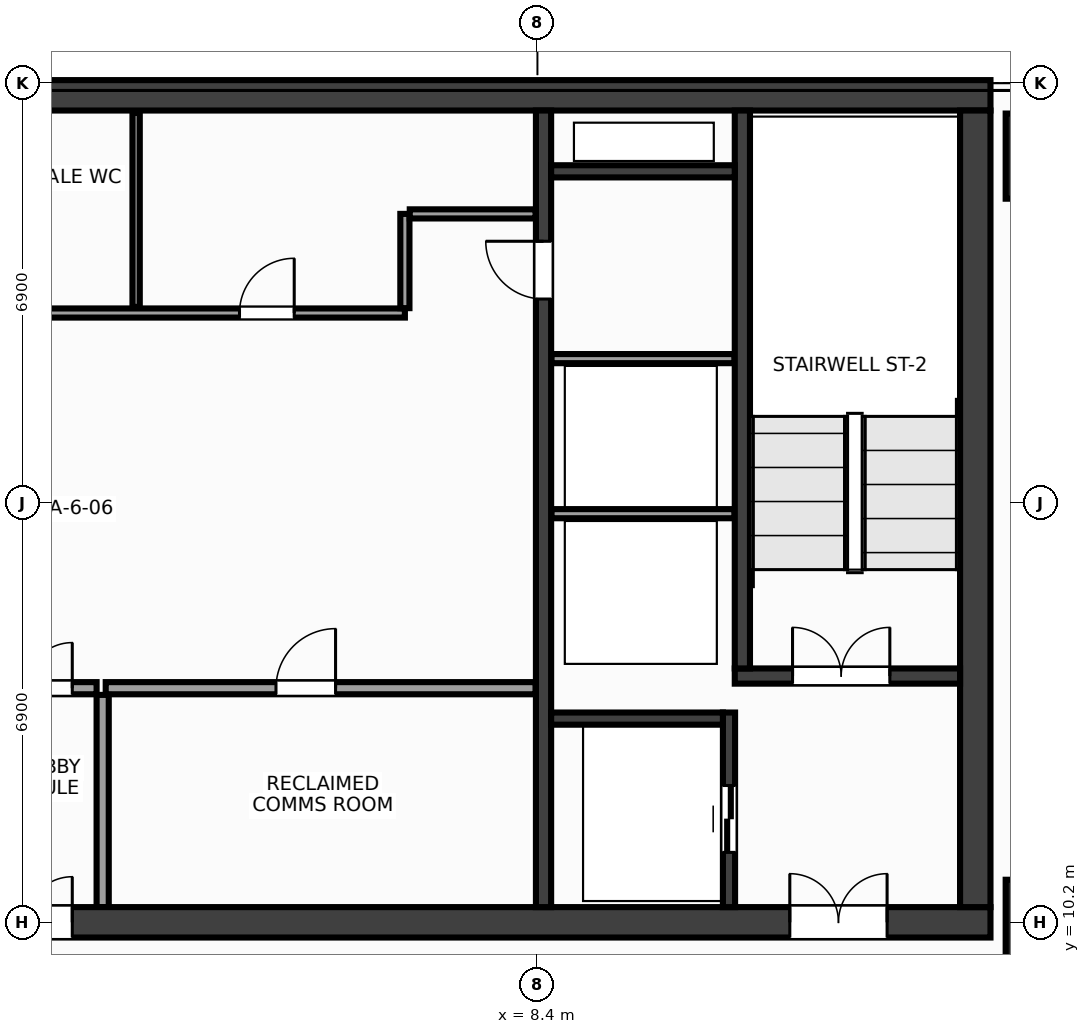
"""IFC4 building model, lengths in metres.
Left out: names, types, materials, properties, quantities, classifications, styles, units other than length and angle.
Written with IfcOpenShell. Run it as: python <this file> out.ifc"""

import sys

from ifc_helpers import new_model, si_unit, direction, frame, frame_2d, origin, origin_2d, place, context, subcontext, project, spatial, rectangle, extrude, source, transform, mapped, element, fill, save


model = new_model("IFC4")
c1 = context("Model", 3, precision=1e-05, world=origin(), true_north=direction((0.0, 1.0)))
c2 = subcontext(c1, "Body", "Model", "MODEL_VIEW")
j1 = project(units=[si_unit("LENGTHUNIT", "METRE"), si_unit("PLANEANGLEUNIT", "RADIAN")], contexts=[c1])
p1 = place(None, origin())
s1 = spatial("IfcSite", under=j1, at=p1, CompositionType="ELEMENT")
p2 = place(p1, origin())
s2 = spatial("IfcBuilding", under=s1, at=p2, CompositionType="ELEMENT")
p3 = place(p2, frame((0.0, 0.0, 210.8)))
s3 = spatial("IfcBuildingStorey", under=s2, at=p3, CompositionType="ELEMENT", Elevation=210.8)
m1 = source(origin(), c2, "Body", "SweptSolid", [
    extrude(rectangle(XDim=31.7, YDim=0.5, at=frame_2d((15.85, 0.0))), origin(), (0.0, 0.0, 1.0), 3.6),
])
p4 = place(p3, frame((-15.85, 23.8, 0.0), z_axis=(0.0, 0.0, 1.0), x_axis=(1.0, 0.0, 0.0)))
e1 = element("IfcWall", 1, at=p4, inside=s3, PredefinedType="SHEAR", context=c2, shape_type="MappedRepresentation", body=[
    mapped(m1, transform((0.0, 0.0, 0.0), x_axis=(1.0, 0.0, 0.0), y_axis=(0.0, 1.0, 0.0), z_axis=(0.0, 0.0, 1.0), scale=1.0)),
])
p5 = place(p3, frame((-15.85, 10.2, 0.0), z_axis=(0.0, 0.0, 1.0), x_axis=(1.0, 0.0, 0.0)))
e2 = element("IfcWall", 2, at=p5, inside=s3, PredefinedType="SHEAR", context=c2, shape_type="MappedRepresentation", body=[
    mapped(m1, transform((0.0, 0.0, 0.0), x_axis=(1.0, 0.0, 0.0), y_axis=(0.0, 1.0, 0.0), z_axis=(0.0, 0.0, 1.0), scale=1.0)),
])
p6 = place(p5, frame((1.7, 0.0, 0.0)))
e3 = element("IfcOpeningElement", 3, at=p6, cuts=e2, PredefinedType="OPENING", context=c2, shape_type="SweptSolid", body=[
    extrude(rectangle(XDim=1.6, YDim=2.15, at=frame_2d((0.8, 1.075))), frame((0.0, 0.262, 0.0), z_axis=(0.0, -1.0, 0.0), x_axis=(1.0, 0.0, 0.0)), (0.0, 0.0, 1.0), 0.524),
])
p7 = place(p5, frame((28.4, 0.0, 0.0)))
e4 = element("IfcOpeningElement", 4, at=p7, cuts=e2, PredefinedType="OPENING", context=c2, shape_type="SweptSolid", body=[
    extrude(rectangle(XDim=1.6, YDim=2.15, at=frame_2d((0.8, 1.075))), frame((0.0, 0.262, 0.0), z_axis=(0.0, -1.0, 0.0), x_axis=(1.0, 0.0, 0.0)), (0.0, 0.0, 1.0), 0.524),
])
p8 = place(p5, frame((15.1, 0.0, 0.0)))
e5 = element("IfcOpeningElement", 5, at=p8, cuts=e2, PredefinedType="OPENING", context=c2, shape_type="SweptSolid", body=[
    extrude(rectangle(XDim=1.5, YDim=2.2, at=frame_2d((0.75, 1.1))), frame((0.0, 0.262, 0.0), z_axis=(0.0, -1.0, 0.0), x_axis=(1.0, 0.0, 0.0)), (0.0, 0.0, 1.0), 0.524),
])
m2 = source(origin(), c2, "Body", "SweptSolid", [
    extrude(rectangle(XDim=13.1, YDim=0.5, at=frame_2d((6.55, 0.0))), origin(), (0.0, 0.0, 1.0), 3.6),
])
p9 = place(p3, frame((15.6, 10.45, 0.0), z_axis=(0.0, 0.0, 1.0), x_axis=(0.0, 1.0, 0.0)))
e6 = element("IfcWall", 6, at=p9, inside=s3, PredefinedType="SHEAR", context=c2, shape_type="MappedRepresentation", body=[
    mapped(m2, transform((0.0, 0.0, 0.0), x_axis=(1.0, 0.0, 0.0), y_axis=(0.0, 1.0, 0.0), z_axis=(0.0, 0.0, 1.0), scale=1.0)),
])
m3 = source(origin(), c2, "Body", "SweptSolid", [
    extrude(rectangle(XDim=13.1, YDim=0.25, at=frame_2d((6.55, 0.0))), origin(), (0.0, 0.0, 1.0), 3.6),
])
p10 = place(p3, frame((8.5, 10.45, 0.0), z_axis=(0.0, 0.0, 1.0), x_axis=(0.0, 1.0, 0.0)))
e7 = element("IfcWall", 7, at=p10, inside=s3, PredefinedType="SHEAR", context=c2, shape_type="MappedRepresentation", body=[
    mapped(m3, transform((0.0, 0.0, 0.0), x_axis=(1.0, 0.0, 0.0), y_axis=(0.0, 1.0, 0.0), z_axis=(0.0, 0.0, 1.0), scale=1.0)),
])
p11 = place(p10, frame((10.0, 0.0, 0.0)))
e8 = element("IfcOpeningElement", 8, at=p11, cuts=e7, PredefinedType="OPENING", context=c2, shape_type="SweptSolid", body=[
    extrude(rectangle(XDim=0.95, YDim=2.15, at=frame_2d((0.475, 1.075))), frame((0.0, 0.137, 0.0), z_axis=(0.0, -1.0, 0.0), x_axis=(1.0, 0.0, 0.0)), (0.0, 0.0, 1.0), 0.274),
])
m4 = source(origin(), c2, "Body", "SweptSolid", [
    extrude(rectangle(XDim=3.705, YDim=0.25, at=frame_2d((1.853, 0.0))), origin(), (0.0, 0.0, 1.0), 3.6),
])
p12 = place(p3, frame((11.645, 14.25, 0.0), z_axis=(0.0, 0.0, 1.0), x_axis=(1.0, 0.0, 0.0)))
e9 = element("IfcWall", 9, at=p12, inside=s3, PredefinedType="SHEAR", context=c2, shape_type="MappedRepresentation", body=[
    mapped(m4, transform((0.0, 0.0, 0.0), x_axis=(1.0, 0.0, 0.0), y_axis=(0.0, 1.0, 0.0), z_axis=(0.0, 0.0, 1.0), scale=1.0)),
])
p13 = place(p12, frame((0.95, 0.0, 0.0)))
e10 = element("IfcOpeningElement", 10, at=p13, cuts=e9, PredefinedType="OPENING", context=c2, shape_type="SweptSolid", body=[
    extrude(rectangle(XDim=1.6, YDim=2.15, at=frame_2d((0.8, 1.075))), frame((0.0, 0.137, 0.0), z_axis=(0.0, -1.0, 0.0), x_axis=(1.0, 0.0, 0.0)), (0.0, 0.0, 1.0), 0.274),
])
m5 = source(origin(), c2, "Body", "SweptSolid", [
    extrude(rectangle(XDim=9.175, YDim=0.25, at=frame_2d((4.587, 0.0))), origin(), (0.0, 0.0, 1.0), 3.6),
])
p14 = place(p3, frame((11.77, 14.375, 0.0), z_axis=(0.0, 0.0, 1.0), x_axis=(0.0, 1.0, 0.0)))
e11 = element("IfcWall", 11, at=p14, inside=s3, PredefinedType="SHEAR", context=c2, shape_type="MappedRepresentation", body=[
    mapped(m5, transform((0.0, 0.0, 0.0), x_axis=(1.0, 0.0, 0.0), y_axis=(0.0, 1.0, 0.0), z_axis=(0.0, 0.0, 1.0), scale=1.0)),
])
m6 = source(origin(), c2, "Body", "SweptSolid", [
    extrude(rectangle(XDim=3.2, YDim=0.2, at=frame_2d((1.6, 0.0))), origin(), (0.0, 0.0, 1.0), 3.6),
])
p15 = place(p3, frame((11.55, 10.45, 0.0), z_axis=(0.0, 0.0, 1.0), x_axis=(0.0, 1.0, 0.0)))
e12 = element("IfcWall", 12, at=p15, inside=s3, PredefinedType="SHEAR", context=c2, shape_type="MappedRepresentation", body=[
    mapped(m6, transform((0.0, 0.0, 0.0), x_axis=(1.0, 0.0, 0.0), y_axis=(0.0, 1.0, 0.0), z_axis=(0.0, 0.0, 1.0), scale=1.0)),
])
p16 = place(p15, frame((0.9, 0.0, 0.0)))
e13 = element("IfcOpeningElement", 13, at=p16, cuts=e12, PredefinedType="OPENING", context=c2, shape_type="SweptSolid", body=[
    extrude(rectangle(XDim=1.1, YDim=2.15, at=frame_2d((0.55, 1.075))), frame((0.0, 0.112, 0.0), z_axis=(0.0, -1.0, 0.0), x_axis=(1.0, 0.0, 0.0)), (0.0, 0.0, 1.0), 0.224),
])
m7 = source(origin(), c2, "Body", "SweptSolid", [
    extrude(rectangle(XDim=2.825, YDim=0.2, at=frame_2d((1.413, 0.0))), origin(), (0.0, 0.0, 1.0), 3.6),
])
p17 = place(p3, frame((8.625, 13.55, 0.0), z_axis=(0.0, 0.0, 1.0), x_axis=(1.0, 0.0, 0.0)))
e14 = element("IfcWall", 14, at=p17, inside=s3, PredefinedType="SHEAR", context=c2, shape_type="MappedRepresentation", body=[
    mapped(m7, transform((0.0, 0.0, 0.0), x_axis=(1.0, 0.0, 0.0), y_axis=(0.0, 1.0, 0.0), z_axis=(0.0, 0.0, 1.0), scale=1.0)),
])
m8 = source(origin(), c2, "Body", "SweptSolid", [
    extrude(rectangle(XDim=3.02, YDim=0.2, at=frame_2d((1.51, 0.0))), origin(), (0.0, 0.0, 1.0), 3.6),
])
p18 = place(p3, frame((8.625, 22.55, 0.0), z_axis=(0.0, 0.0, 1.0), x_axis=(1.0, 0.0, 0.0)))
e15 = element("IfcWall", 15, at=p18, inside=s3, PredefinedType="SHEAR", context=c2, shape_type="MappedRepresentation", body=[
    mapped(m8, transform((0.0, 0.0, 0.0), x_axis=(1.0, 0.0, 0.0), y_axis=(0.0, 1.0, 0.0), z_axis=(0.0, 0.0, 1.0), scale=1.0)),
])
m9 = source(origin(), c2, "Body", "SweptSolid", [
    extrude(rectangle(XDim=1.4, YDim=1.4, at=origin_2d()), origin(), (0.0, 0.0, 1.0), 3.6),
])
for number, where, z_axis, x_axis in (
    (16, (16.8, 10.2, 0.0), (0.0, 0.0, 1.0), (1.0, 0.0, 0.0)),
    (17, (16.8, 22.8, 0.0), (0.0, 0.0, 1.0), (1.0, 0.0, 0.0)),
):
    element("IfcColumn", number, at=place(p3, frame(where, z_axis=z_axis, x_axis=x_axis)), inside=s3, PredefinedType="COLUMN", context=c2, shape_type="MappedRepresentation", body=[
        mapped(m9, transform((0.0, 0.0, 0.0), x_axis=(1.0, 0.0, 0.0), y_axis=(0.0, 1.0, 0.0), z_axis=(0.0, 0.0, 1.0), scale=1.0)),
    ])
m10 = source(origin(), c2, "Body", "SweptSolid", [
    extrude(rectangle(XDim=3.01, YDim=0.15, at=frame_2d((1.505, 0.0))), origin(), (0.0, 0.0, 1.0), 3.38),
])
for number, where, z_axis, x_axis in (
    (18, (8.63, 16.92, 0.0), (0.0, 0.0, 1.0), (1.0, 0.0, 0.0)),
    (19, (8.63, 19.47, 0.0), (0.0, 0.0, 1.0), (1.0, 0.0, 0.0)),
):
    element("IfcWall", number, at=place(p3, frame(where, z_axis=z_axis, x_axis=x_axis)), inside=s3, PredefinedType="PARTITIONING", context=c2, shape_type="MappedRepresentation", body=[
        mapped(m10, transform((0.0, 0.0, 0.0), x_axis=(1.0, 0.0, 0.0), y_axis=(0.0, 1.0, 0.0), z_axis=(0.0, 0.0, 1.0), scale=1.0)),
    ])
m11 = source(origin(), c2, "Body", "SweptSolid", [
    extrude(rectangle(XDim=7.07, YDim=0.2, at=frame_2d((3.535, 0.0))), origin(), (0.0, 0.0, 1.0), 3.38),
])
p19 = place(p3, frame((1.3, 14.05, 0.0), z_axis=(0.0, 0.0, 1.0), x_axis=(1.0, 0.0, 0.0)))
e20 = element("IfcWall", 20, at=p19, inside=s3, PredefinedType="PARTITIONING", context=c2, shape_type="MappedRepresentation", body=[
    mapped(m11, transform((0.0, 0.0, 0.0), x_axis=(1.0, 0.0, 0.0), y_axis=(0.0, 1.0, 0.0), z_axis=(0.0, 0.0, 1.0), scale=1.0)),
])
p20 = place(p19, frame((2.8, 0.0, 0.0)))
e21 = element("IfcOpeningElement", 21, at=p20, cuts=e20, PredefinedType="OPENING", context=c2, shape_type="SweptSolid", body=[
    extrude(rectangle(XDim=0.98, YDim=2.15, at=frame_2d((0.49, 1.075))), frame((0.0, 0.112, 0.0), z_axis=(0.0, -1.0, 0.0), x_axis=(1.0, 0.0, 0.0)), (0.0, 0.0, 1.0), 0.224),
])
m12 = source(origin(), c2, "Body", "SweptSolid", [
    extrude(rectangle(XDim=3.49, YDim=0.2, at=frame_2d((1.745, 0.0))), origin(), (0.0, 0.0, 1.0), 3.38),
])
p21 = place(p3, frame((1.25, 10.45, 0.0), z_axis=(0.0, 0.0, 1.0), x_axis=(0.0, 1.0, 0.0)))
e22 = element("IfcWall", 22, at=p21, inside=s3, PredefinedType="PARTITIONING", context=c2, shape_type="MappedRepresentation", body=[
    mapped(m12, transform((0.0, 0.0, 0.0), x_axis=(1.0, 0.0, 0.0), y_axis=(0.0, 1.0, 0.0), z_axis=(0.0, 0.0, 1.0), scale=1.0)),
])
m13 = source(origin(), c2, "Body", "SweptSolid", [
    extrude(rectangle(XDim=2.3, YDim=0.2, at=frame_2d((1.15, 0.0))), origin(), (0.0, 0.0, 1.0), 3.38),
])
p22 = place(p3, frame((-1.15, 14.05, 0.0), z_axis=(0.0, 0.0, 1.0), x_axis=(1.0, 0.0, 0.0)))
e23 = element("IfcWall", 23, at=p22, inside=s3, PredefinedType="PARTITIONING", context=c2, shape_type="MappedRepresentation", body=[
    mapped(m13, transform((0.0, 0.0, 0.0), x_axis=(1.0, 0.0, 0.0), y_axis=(0.0, 1.0, 0.0), z_axis=(0.0, 0.0, 1.0), scale=1.0)),
])
p23 = place(p22, frame((0.4, 0.0, 0.0)))
e24 = element("IfcOpeningElement", 24, at=p23, cuts=e23, PredefinedType="OPENING", context=c2, shape_type="SweptSolid", body=[
    extrude(rectangle(XDim=1.5, YDim=2.2, at=frame_2d((0.75, 1.1))), frame((0.0, 0.112, 0.0), z_axis=(0.0, -1.0, 0.0), x_axis=(1.0, 0.0, 0.0)), (0.0, 0.0, 1.0), 0.224),
])
m14 = source(origin(), c2, "Body", "SweptSolid", [
    extrude(rectangle(XDim=14.59, YDim=0.15, at=frame_2d((7.295, 0.0))), origin(), (0.0, 0.0, 1.0), 3.38),
])
p24 = place(p3, frame((-8.37, 20.22, 0.0), z_axis=(0.0, 0.0, 1.0), x_axis=(1.0, 0.0, 0.0)))
e25 = element("IfcWall", 25, at=p24, inside=s3, PredefinedType="PARTITIONING", context=c2, shape_type="MappedRepresentation", body=[
    mapped(m14, transform((0.0, 0.0, 0.0), x_axis=(1.0, 0.0, 0.0), y_axis=(0.0, 1.0, 0.0), z_axis=(0.0, 0.0, 1.0), scale=1.0)),
])
p25 = place(p24, frame((1.06, 0.0, 0.0)))
e26 = element("IfcOpeningElement", 26, at=p25, cuts=e25, PredefinedType="OPENING", context=c2, shape_type="SweptSolid", body=[
    extrude(rectangle(XDim=0.9, YDim=2.15, at=frame_2d((0.45, 1.075))), frame((0.0, 0.087, 0.0), z_axis=(0.0, -1.0, 0.0), x_axis=(1.0, 0.0, 0.0)), (0.0, 0.0, 1.0), 0.174),
])
p26 = place(p24, frame((4.22, 0.0, 0.0)))
e27 = element("IfcOpeningElement", 27, at=p26, cuts=e25, PredefinedType="OPENING", context=c2, shape_type="SweptSolid", body=[
    extrude(rectangle(XDim=0.9, YDim=2.15, at=frame_2d((0.45, 1.075))), frame((0.0, 0.087, 0.0), z_axis=(0.0, -1.0, 0.0), x_axis=(1.0, 0.0, 0.0)), (0.0, 0.0, 1.0), 0.174),
])
p27 = place(p24, frame((7.82, 0.0, 0.0)))
e28 = element("IfcOpeningElement", 28, at=p27, cuts=e25, PredefinedType="OPENING", context=c2, shape_type="SweptSolid", body=[
    extrude(rectangle(XDim=0.9, YDim=2.15, at=frame_2d((0.45, 1.075))), frame((0.0, 0.087, 0.0), z_axis=(0.0, -1.0, 0.0), x_axis=(1.0, 0.0, 0.0)), (0.0, 0.0, 1.0), 0.174),
])
p28 = place(p24, frame((11.87, 0.0, 0.0)))
e29 = element("IfcOpeningElement", 29, at=p28, cuts=e25, PredefinedType="OPENING", context=c2, shape_type="SweptSolid", body=[
    extrude(rectangle(XDim=0.9, YDim=2.15, at=frame_2d((0.45, 1.075))), frame((0.0, 0.087, 0.0), z_axis=(0.0, -1.0, 0.0), x_axis=(1.0, 0.0, 0.0)), (0.0, 0.0, 1.0), 0.174),
])
m15 = source(origin(), c2, "Body", "SweptSolid", [
    extrude(rectangle(XDim=1.55, YDim=0.15, at=frame_2d((0.775, 0.0))), origin(), (0.0, 0.0, 1.0), 3.38),
])
p29 = place(p3, frame((6.22, 20.3, 0.0), z_axis=(0.0, 0.0, 1.0), x_axis=(0.0, 1.0, 0.0)))
e30 = element("IfcWall", 30, at=p29, inside=s3, PredefinedType="PARTITIONING", context=c2, shape_type="MappedRepresentation", body=[
    mapped(m15, transform((0.0, 0.0, 0.0), x_axis=(1.0, 0.0, 0.0), y_axis=(0.0, 1.0, 0.0), z_axis=(0.0, 0.0, 1.0), scale=1.0)),
])
m16 = source(origin(), c2, "Body", "SweptSolid", [
    extrude(rectangle(XDim=2.07, YDim=0.15, at=frame_2d((1.035, 0.0))), origin(), (0.0, 0.0, 1.0), 3.38),
])
p30 = place(p3, frame((6.3, 21.85, 0.0), z_axis=(0.0, 0.0, 1.0), x_axis=(1.0, 0.0, 0.0)))
e31 = element("IfcWall", 31, at=p30, inside=s3, PredefinedType="PARTITIONING", context=c2, shape_type="MappedRepresentation", body=[
    mapped(m16, transform((0.0, 0.0, 0.0), x_axis=(1.0, 0.0, 0.0), y_axis=(0.0, 1.0, 0.0), z_axis=(0.0, 0.0, 1.0), scale=1.0)),
])
m17 = source(origin(), c2, "Body", "SweptSolid", [
    extrude(rectangle(XDim=3.19, YDim=0.12, at=frame_2d((1.595, 0.0))), origin(), (0.0, 0.0, 1.0), 3.38),
])
p31 = place(p3, frame((1.8, 20.32, 0.0), z_axis=(0.0, 0.0, 1.0), x_axis=(0.0, 1.0, 0.0)))
e32 = element("IfcWall", 32, at=p31, inside=s3, PredefinedType="PARTITIONING", context=c2, shape_type="MappedRepresentation", body=[
    mapped(m17, transform((0.0, 0.0, 0.0), x_axis=(1.0, 0.0, 0.0), y_axis=(0.0, 1.0, 0.0), z_axis=(0.0, 0.0, 1.0), scale=1.0)),
])
m18 = source(origin(), c2, "Body", "SweptSolid", [
    extrude(rectangle(XDim=1.6, YDim=2.15, at=frame_2d((0.8, 1.075))), frame((0.0, 0.025, 0.0), z_axis=(0.0, -1.0, 0.0), x_axis=(1.0, 0.0, 0.0)), (0.0, 0.0, 1.0), 0.05),
])
p32 = place(p13, origin())
e33 = element("IfcDoor", 33, at=p32, inside=s3, OperationType="DOUBLE_DOOR_SINGLE_SWING", PredefinedType="DOOR", context=c2, shape_type="MappedRepresentation", body=[
    mapped(m18, transform((0.0, 0.0, 0.0), x_axis=(1.0, 0.0, 0.0), y_axis=(0.0, 1.0, 0.0), z_axis=(0.0, 0.0, 1.0), scale=1.0)),
])
fill(e10, e33)
p33 = place(p7, origin())
e34 = element("IfcDoor", 34, at=p33, inside=s3, OperationType="DOUBLE_DOOR_SINGLE_SWING", PredefinedType="DOOR", context=c2, shape_type="MappedRepresentation", body=[
    mapped(m18, transform((0.0, 0.0, 0.0), x_axis=(1.0, 0.0, 0.0), y_axis=(0.0, 1.0, 0.0), z_axis=(0.0, 0.0, 1.0), scale=1.0)),
])
fill(e4, e34)
m19 = source(origin(), c2, "Body", "SweptSolid", [
    extrude(rectangle(XDim=1.1, YDim=2.15, at=frame_2d((0.55, 1.075))), frame((0.0, 0.025, 0.0), z_axis=(0.0, -1.0, 0.0), x_axis=(1.0, 0.0, 0.0)), (0.0, 0.0, 1.0), 0.05),
])
p34 = place(p16, origin())
e35 = element("IfcDoor", 35, at=p34, inside=s3, OperationType="DOUBLE_DOOR_SLIDING", PredefinedType="DOOR", context=c2, shape_type="MappedRepresentation", body=[
    mapped(m19, transform((0.0, 0.0, 0.0), x_axis=(1.0, 0.0, 0.0), y_axis=(0.0, 1.0, 0.0), z_axis=(0.0, 0.0, 1.0), scale=1.0)),
])
fill(e13, e35)
m20 = source(origin(), c2, "Body", "SweptSolid", [
    extrude(rectangle(XDim=0.95, YDim=2.15, at=frame_2d((0.475, 1.075))), frame((0.0, 0.025, 0.0), z_axis=(0.0, -1.0, 0.0), x_axis=(1.0, 0.0, 0.0)), (0.0, 0.0, 1.0), 0.05),
])
p35 = place(p11, origin())
e36 = element("IfcDoor", 36, at=p35, inside=s3, OperationType="SINGLE_SWING_RIGHT", PredefinedType="DOOR", context=c2, shape_type="MappedRepresentation", body=[
    mapped(m20, transform((0.0, 0.0, 0.0), x_axis=(1.0, 0.0, 0.0), y_axis=(0.0, 1.0, 0.0), z_axis=(0.0, 0.0, 1.0), scale=1.0)),
])
fill(e8, e36)
m21 = source(origin(), c2, "Body", "SweptSolid", [
    extrude(rectangle(XDim=0.98, YDim=2.15, at=frame_2d((0.49, 1.075))), frame((0.0, 0.025, 0.0), z_axis=(0.0, -1.0, 0.0), x_axis=(1.0, 0.0, 0.0)), (0.0, 0.0, 1.0), 0.05),
])
p36 = place(p20, origin())
e37 = element("IfcDoor", 37, at=p36, inside=s3, OperationType="SINGLE_SWING_RIGHT", PredefinedType="DOOR", context=c2, shape_type="MappedRepresentation", body=[
    mapped(m21, transform((0.0, 0.0, 0.0), x_axis=(1.0, 0.0, 0.0), y_axis=(0.0, 1.0, 0.0), z_axis=(0.0, 0.0, 1.0), scale=1.0)),
])
fill(e21, e37)
m22 = source(origin(), c2, "Body", "SweptSolid", [
    extrude(rectangle(XDim=1.5, YDim=2.2, at=frame_2d((0.75, 1.1))), frame((0.0, 0.025, 0.0), z_axis=(0.0, -1.0, 0.0), x_axis=(1.0, 0.0, 0.0)), (0.0, 0.0, 1.0), 0.05),
])
p37 = place(p23, origin())
e38 = element("IfcDoor", 38, at=p37, inside=s3, OperationType="DOUBLE_DOOR_SINGLE_SWING", PredefinedType="DOOR", context=c2, shape_type="MappedRepresentation", body=[
    mapped(m22, transform((0.0, 0.0, 0.0), x_axis=(1.0, 0.0, 0.0), y_axis=(0.0, 1.0, 0.0), z_axis=(0.0, 0.0, 1.0), scale=1.0)),
])
fill(e24, e38)
p38 = place(p8, origin())
e39 = element("IfcDoor", 39, at=p38, inside=s3, OperationType="DOUBLE_DOOR_SINGLE_SWING", PredefinedType="DOOR", context=c2, shape_type="MappedRepresentation", body=[
    mapped(m22, transform((0.0, 0.0, 0.0), x_axis=(1.0, 0.0, 0.0), y_axis=(0.0, 1.0, 0.0), z_axis=(0.0, 0.0, 1.0), scale=1.0)),
])
fill(e5, e39)
m23 = source(origin(), c2, "Body", "SweptSolid", [
    extrude(rectangle(XDim=0.9, YDim=2.15, at=frame_2d((0.45, 1.075))), frame((0.0, 0.025, 0.0), z_axis=(0.0, -1.0, 0.0), x_axis=(1.0, 0.0, 0.0)), (0.0, 0.0, 1.0), 0.05),
])
p39 = place(p28, origin())
e40 = element("IfcDoor", 40, at=p39, inside=s3, OperationType="SINGLE_SWING_RIGHT", PredefinedType="DOOR", context=c2, shape_type="MappedRepresentation", body=[
    mapped(m23, transform((0.0, 0.0, 0.0), x_axis=(1.0, 0.0, 0.0), y_axis=(0.0, 1.0, 0.0), z_axis=(0.0, 0.0, 1.0), scale=1.0)),
])
fill(e29, e40)
save(model, sys.argv[1])
